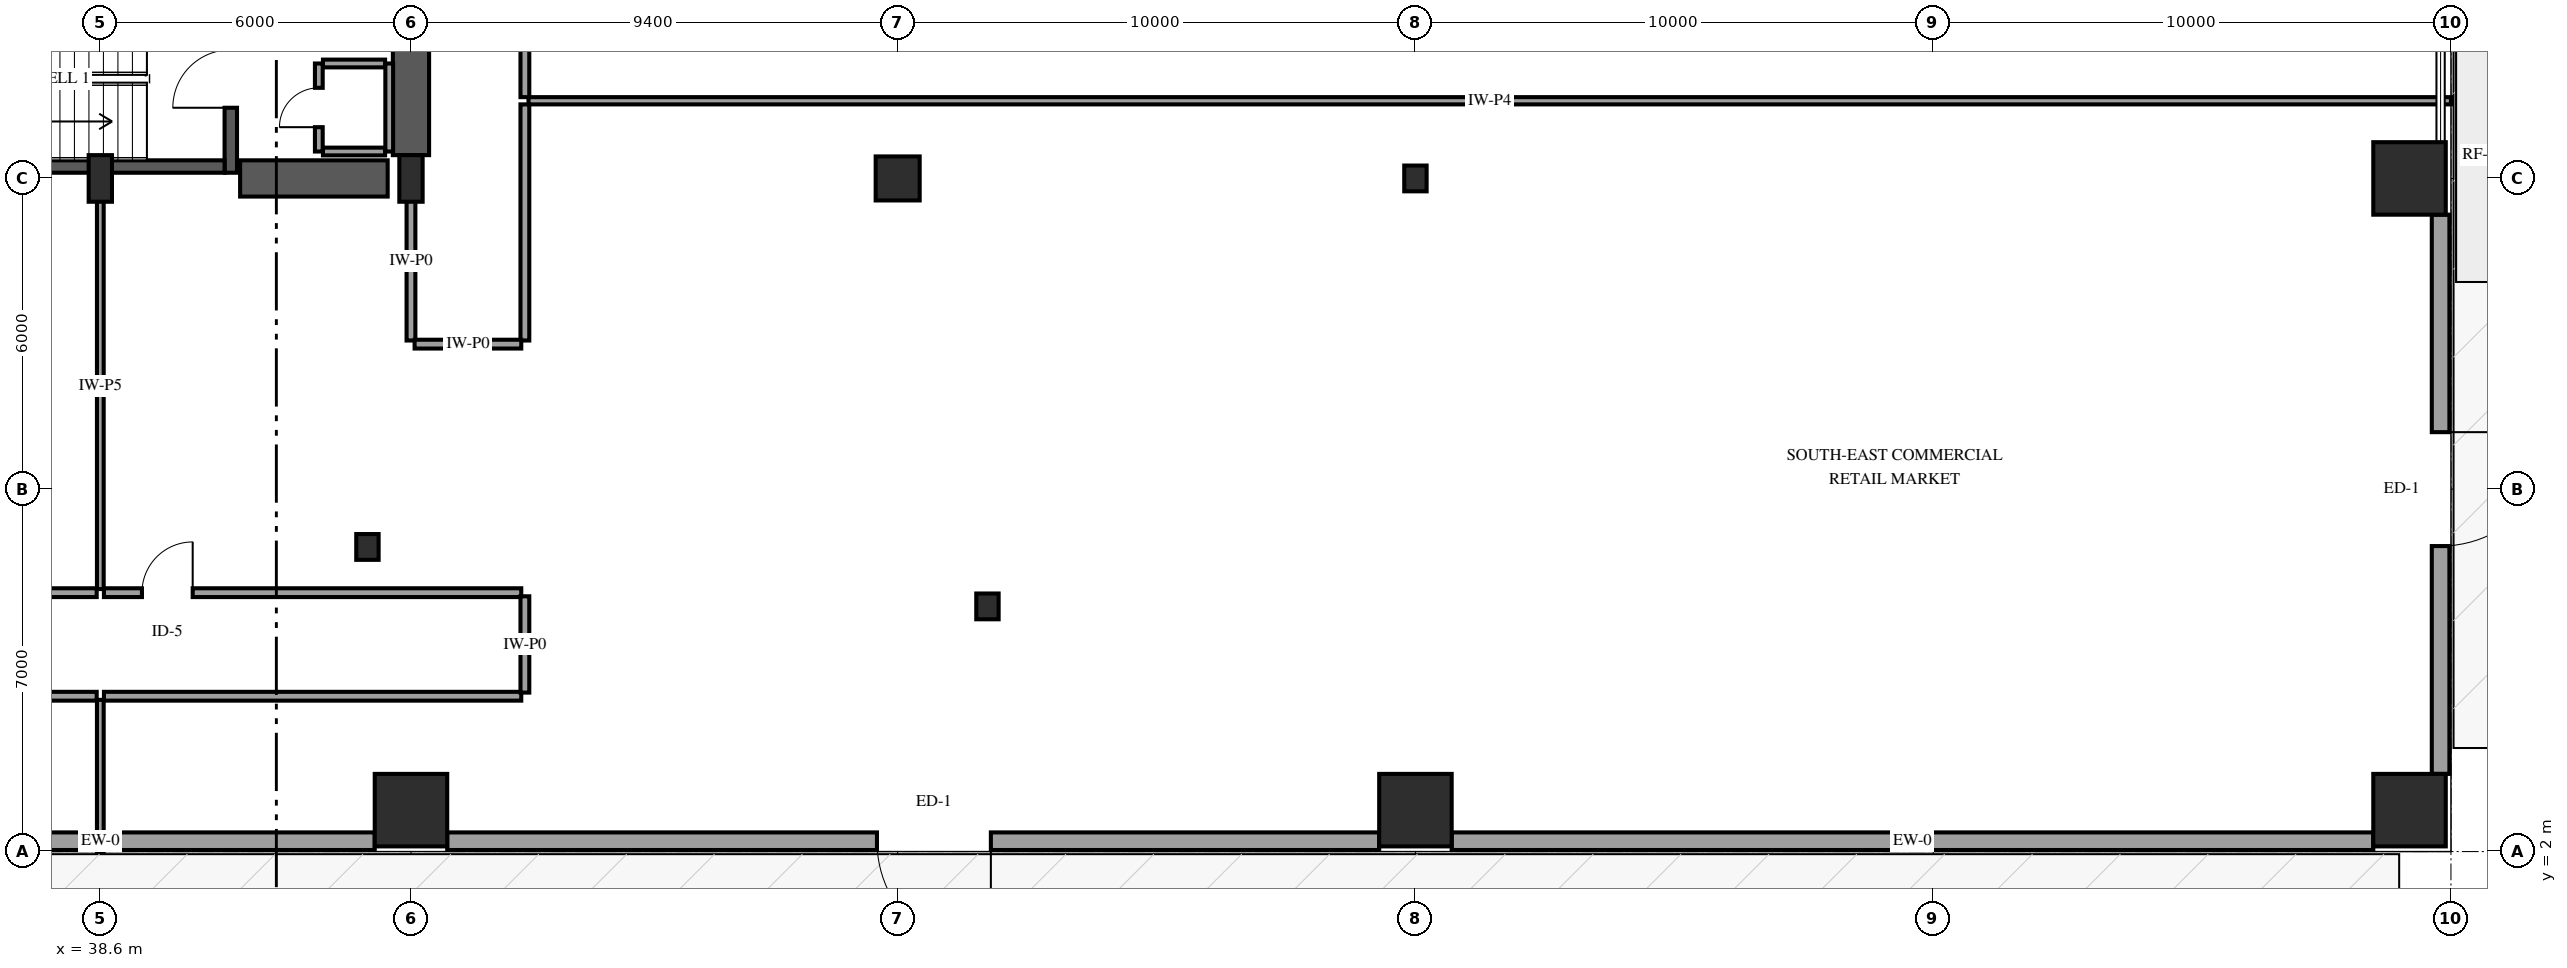
"""IFC4 building model, lengths in metres.
Left out: names, types, materials, properties, quantities, classifications, styles, units other than length and angle.
Written with IfcOpenShell. Run it as: python <this file> out.ifc"""

import sys

from ifc_helpers import new_model, si_unit, direction, frame, frame_2d, origin, origin_2d, place, context, subcontext, project, spatial, rectangle, i_section, extrude, element, fill, save


model = new_model("IFC4")
c1 = context("Model", 3, precision=1e-05, world=origin(), true_north=direction((0.0, 1.0)))
c2 = subcontext(c1, "Body", "Model", "MODEL_VIEW")
j1 = project(units=[si_unit("LENGTHUNIT", "METRE"), si_unit("PLANEANGLEUNIT", "RADIAN")], contexts=[c1])
p1 = place(None, origin())
s1 = spatial("IfcSite", under=j1, at=p1, CompositionType="ELEMENT")
p2 = place(p1, origin())
s2 = spatial("IfcBuilding", under=s1, at=p2, CompositionType="ELEMENT")
p3 = place(p2, origin())
s3 = spatial("IfcBuildingStorey", under=s2, at=p3, CompositionType="ELEMENT", Elevation=0.0)
p4 = place(p3, frame((41.12, 15.11, 0.0), z_axis=(0.0, 0.0, 1.0), x_axis=(0.0, 1.0, 0.0)))
e1 = element("IfcWall", 1, at=p4, inside=s3, PredefinedType="SHEAR", context=c2, shape_type="SweptSolid", body=[
    extrude(rectangle(XDim=3.63, YDim=0.24, at=frame_2d((1.815, 0.0))), origin(), (0.0, 0.0, 1.0), 6.0),
])
p5 = place(p4, frame((1.255, 0.0, 0.0)))
e2 = element("IfcOpeningElement", 2, at=p5, cuts=e1, PredefinedType="OPENING", context=c2, shape_type="SweptSolid", body=[
    extrude(rectangle(XDim=1.12, YDim=2.15, at=frame_2d((0.56, 1.075))), frame((0.0, 0.13, 0.0), z_axis=(0.0, -1.0, 0.0), x_axis=(1.0, 0.0, 0.0)), (0.0, 0.0, 1.0), 0.26),
])
p6 = place(p3, frame((33.0, 15.23, 0.0), z_axis=(0.0, 0.0, 1.0), x_axis=(1.0, 0.0, 0.0)))
e3 = element("IfcWall", 3, at=p6, inside=s3, PredefinedType="SHEAR", context=c2, shape_type="SweptSolid", body=[
    extrude(rectangle(XDim=8.0, YDim=0.24, at=frame_2d((4.0, 0.0))), origin(), (0.0, 0.0, 1.0), 6.0),
])
p7 = place(p3, frame((41.3, 15.0, 0.0), z_axis=(0.0, 0.0, 1.0), x_axis=(1.0, 0.0, 0.0)))
e4 = element("IfcWall", 4, at=p7, inside=s3, PredefinedType="SHEAR", context=c2, shape_type="SweptSolid", body=[
    extrude(rectangle(XDim=2.85, YDim=0.7, at=frame_2d((1.425, 0.0))), origin(), (0.0, 0.0, 1.0), 6.0),
])
p8 = place(p3, frame((44.6, 15.45, 0.0), z_axis=(0.0, 0.0, 1.0), x_axis=(0.0, 1.0, 0.0)))
e5 = element("IfcWall", 5, at=p8, inside=s3, PredefinedType="SHEAR", context=c2, shape_type="SweptSolid", body=[
    extrude(rectangle(XDim=6.35, YDim=0.7, at=frame_2d((3.175, 0.0))), origin(), (0.0, 0.0, 1.0), 6.0),
])
for number, where, z_axis, x_axis in (
    (6, (38.6, 15.0, 0.0), (0.0, 0.0, 1.0), (1.0, 0.0, 0.0)),
    (7, (44.6, 15.0, 0.0), (0.0, 0.0, 1.0), (1.0, 0.0, 0.0)),
):
    element("IfcColumn", number, at=place(p3, frame(where, z_axis=z_axis, x_axis=x_axis)), inside=s3, PredefinedType="PILASTER", context=c2, shape_type="SweptSolid", body=[
        extrude(rectangle(XDim=0.45, YDim=0.9, at=origin_2d()), origin(), (0.0, 0.0, 1.0), 6.0),
    ])
for number, where, z_axis, x_axis in (
    (8, (64.0, 2.8, 0.0), (0.0, 0.0, 1.0), (1.0, 0.0, 0.0)),
    (9, (83.2, 2.8, 0.0), (0.0, 0.0, 1.0), (1.0, 0.0, 0.0)),
):
    element("IfcColumn", number, at=place(p3, frame(where, z_axis=z_axis, x_axis=x_axis)), inside=s3, PredefinedType="COLUMN", context=c2, shape_type="SweptSolid", body=[
        extrude(rectangle(XDim=1.4, YDim=1.4, at=origin_2d()), origin(), (0.0, 0.0, 1.0), 6.0),
    ])
p9 = place(p3, frame((64.0, 15.0, 0.0), z_axis=(0.0, 0.0, 1.0), x_axis=(1.0, 0.0, 0.0)))
e10 = element("IfcColumn", 10, at=p9, inside=s3, PredefinedType="COLUMN", context=c2, shape_type="SweptSolid", body=[
    extrude(i_section(OverallWidth=0.432, OverallDepth=0.498, WebThickness=0.056, FlangeThickness=0.089, FilletRadius=0.038, at=origin_2d()), origin(), (0.0, 0.0, 1.0), 6.0),
])
for number, where, z_axis, x_axis in (
    (11, (83.2, 15.0, 0.0), (0.0, 0.0, 1.0), (1.0, 0.0, 0.0)),
    (12, (44.6, 2.8, 0.0), (0.0, 0.0, 1.0), (1.0, 0.0, 0.0)),
):
    element("IfcColumn", number, at=place(p3, frame(where, z_axis=z_axis, x_axis=x_axis)), inside=s3, PredefinedType="COLUMN", context=c2, shape_type="SweptSolid", body=[
        extrude(rectangle(XDim=1.4, YDim=1.4, at=origin_2d()), origin(), (0.0, 0.0, 1.0), 6.0),
    ])
p10 = place(p3, frame((54.0, 15.0, 0.0), z_axis=(0.0, 0.0, 1.0), x_axis=(1.0, 0.0, 0.0)))
e13 = element("IfcColumn", 13, at=p10, inside=s3, PredefinedType="COLUMN", context=c2, shape_type="SweptSolid", body=[
    extrude(rectangle(XDim=0.85, YDim=0.85, at=origin_2d()), origin(), (0.0, 0.0, 1.0), 6.0),
])
for number, where, z_axis, x_axis in (
    (14, (43.759, 7.883, 0.0), (0.0, 0.0, 1.0), (1.0, 0.0, 0.0)),
    (15, (55.734, 6.735, 0.0), (0.0, 0.0, 1.0), (1.0, 0.0, 0.0)),
):
    element("IfcColumn", number, at=place(p3, frame(where, z_axis=z_axis, x_axis=x_axis)), inside=s3, PredefinedType="COLUMN", context=c2, shape_type="SweptSolid", body=[
        extrude(i_section(OverallWidth=0.432, OverallDepth=0.498, WebThickness=0.056, FlangeThickness=0.089, FilletRadius=0.038, at=origin_2d()), origin(), (0.0, 0.0, 1.0), 6.0),
    ])
p11 = place(p3, frame((43.9, 2.2, 0.0), z_axis=(0.0, 0.0, 1.0), x_axis=(-1.0, 0.0, 0.0)))
e16 = element("IfcWall", 16, at=p11, inside=s3, PredefinedType="SOLIDWALL", context=c2, shape_type="SweptSolid", body=[
    extrude(rectangle(XDim=10.6, YDim=0.34, at=frame_2d((5.3, 0.0))), origin(), (0.0, 0.0, 1.0), 2.64),
])
p12 = place(p11, frame((6.8, 0.0, 0.0)))
e17 = element("IfcOpeningElement", 17, at=p12, cuts=e16, PredefinedType="OPENING", context=c2, shape_type="SweptSolid", body=[
    extrude(rectangle(XDim=1.8, YDim=2.3, at=frame_2d((0.9, 1.15))), frame((0.0, 0.18, 0.0), z_axis=(0.0, -1.0, 0.0), x_axis=(1.0, 0.0, 0.0)), (0.0, 0.0, 1.0), 0.36),
])
p13 = place(p3, frame((63.3, 2.2, 0.0), z_axis=(0.0, 0.0, 1.0), x_axis=(-1.0, 0.0, 0.0)))
e18 = element("IfcWall", 18, at=p13, inside=s3, PredefinedType="SOLIDWALL", context=c2, shape_type="SweptSolid", body=[
    extrude(rectangle(XDim=18.0, YDim=0.34, at=frame_2d((9.0, 0.0))), origin(), (0.0, 0.0, 1.0), 4.736),
])
p14 = place(p13, frame((7.5, 0.0, 0.0)))
e19 = element("IfcOpeningElement", 19, at=p14, cuts=e18, PredefinedType="OPENING", context=c2, shape_type="SweptSolid", body=[
    extrude(rectangle(XDim=2.2, YDim=2.4, at=frame_2d((1.1, 1.2))), frame((0.0, 0.18, 0.0), z_axis=(0.0, -1.0, 0.0), x_axis=(1.0, 0.0, 0.0)), (0.0, 0.0, 1.0), 0.36),
])
p15 = place(p3, frame((82.5, 2.2, 0.0), z_axis=(0.0, 0.0, 1.0), x_axis=(-1.0, 0.0, 0.0)))
e20 = element("IfcWall", 20, at=p15, inside=s3, PredefinedType="SOLIDWALL", context=c2, shape_type="SweptSolid", body=[
    extrude(rectangle(XDim=17.8, YDim=0.34, at=frame_2d((8.9, 0.0))), origin(), (0.0, 0.0, 1.0), 4.736),
])
p16 = place(p3, frame((83.8, 14.3, 0.0), z_axis=(0.0, 0.0, 1.0), x_axis=(0.0, -1.0, 0.0)))
e21 = element("IfcWall", 21, at=p16, inside=s3, PredefinedType="SOLIDWALL", context=c2, shape_type="SweptSolid", body=[
    extrude(rectangle(XDim=10.8, YDim=0.34, at=frame_2d((5.4, 0.0))), origin(), (0.0, 0.0, 1.0), 4.736),
])
p17 = place(p16, frame((4.2, 0.0, 0.0)))
e22 = element("IfcOpeningElement", 22, at=p17, cuts=e21, PredefinedType="OPENING", context=c2, shape_type="SweptSolid", body=[
    extrude(rectangle(XDim=2.2, YDim=2.4, at=frame_2d((1.1, 1.2))), frame((0.0, 0.18, 0.0), z_axis=(0.0, -1.0, 0.0), x_axis=(1.0, 0.0, 0.0)), (0.0, 0.0, 1.0), 0.36),
])
for number, where, z_axis, x_axis in (
    (23, (42.9, 15.52, 0.0), (0.0, 0.0, 1.0), (1.0, 0.0, 0.0)),
    (24, (42.9, 17.22, 0.0), (0.0, 0.0, 1.0), (1.0, 0.0, 0.0)),
):
    element("IfcWall", number, at=place(p3, frame(where, z_axis=z_axis, x_axis=x_axis)), inside=s3, PredefinedType="PARTITIONING", context=c2, shape_type="SweptSolid", body=[
        extrude(rectangle(XDim=1.2, YDim=0.15, at=frame_2d((0.6, 0.0))), origin(), (0.0, 0.0, 1.0), 5.68),
    ])
p18 = place(p3, frame((44.18, 15.52, 0.0), z_axis=(0.0, 0.0, 1.0), x_axis=(0.0, 1.0, 0.0)))
e25 = element("IfcWall", 25, at=p18, inside=s3, PredefinedType="PARTITIONING", context=c2, shape_type="SweptSolid", body=[
    extrude(rectangle(XDim=1.7, YDim=0.15, at=frame_2d((0.85, 0.0))), origin(), (0.0, 0.0, 1.0), 5.68),
])
p19 = place(p3, frame((42.82, 15.52, 0.0), z_axis=(0.0, 0.0, 1.0), x_axis=(0.0, 1.0, 0.0)))
e26 = element("IfcWall", 26, at=p19, inside=s3, PredefinedType="PARTITIONING", context=c2, shape_type="SweptSolid", body=[
    extrude(rectangle(XDim=1.7, YDim=0.15, at=frame_2d((0.85, 0.0))), origin(), (0.0, 0.0, 1.0), 5.68),
])
p20 = place(p19, frame((0.47, 0.0, 0.0)))
e27 = element("IfcOpeningElement", 27, at=p20, cuts=e26, PredefinedType="OPENING", context=c2, shape_type="SweptSolid", body=[
    extrude(rectangle(XDim=0.76, YDim=2.0, at=frame_2d((0.38, 1.0))), frame((0.0, 0.085, 0.0), z_axis=(0.0, -1.0, 0.0), x_axis=(1.0, 0.0, 0.0)), (0.0, 0.0, 1.0), 0.17),
])
p21 = place(p3, frame((46.87, 16.5, 0.0), z_axis=(0.0, 0.0, 1.0), x_axis=(1.0, 0.0, 0.0)))
e28 = element("IfcWall", 28, at=p21, inside=s3, PredefinedType="PARTITIONING", context=c2, shape_type="SweptSolid", body=[
    extrude(rectangle(XDim=37.13, YDim=0.14, at=frame_2d((18.565, 0.0))), origin(), (0.0, 0.0, 1.0), 5.68),
])
p22 = place(p3, frame((38.53, 5.0, 0.0), z_axis=(0.0, 0.0, 1.0), x_axis=(-1.0, 0.0, 0.0)))
e29 = element("IfcWall", 29, at=p22, inside=s3, PredefinedType="PARTITIONING", context=c2, shape_type="SweptSolid", body=[
    extrude(rectangle(XDim=24.46, YDim=0.17, at=frame_2d((12.23, 0.0))), origin(), (0.0, 0.0, 1.0), 5.68),
])
p23 = place(p22, frame((11.755, 0.0, 0.0)))
e30 = element("IfcOpeningElement", 30, at=p23, cuts=e29, PredefinedType="OPENING", context=c2, shape_type="SweptSolid", body=[
    extrude(rectangle(XDim=0.98, YDim=2.15, at=frame_2d((0.49, 1.075))), frame((0.0, 0.095, 0.0), z_axis=(0.0, -1.0, 0.0), x_axis=(1.0, 0.0, 0.0)), (0.0, 0.0, 1.0), 0.19),
])
p24 = place(p3, frame((46.8, 33.43, 0.0), z_axis=(0.0, 0.0, 1.0), x_axis=(0.0, -1.0, 0.0)))
e31 = element("IfcWall", 31, at=p24, inside=s3, PredefinedType="PARTITIONING", context=c2, shape_type="SweptSolid", body=[
    extrude(rectangle(XDim=16.86, YDim=0.17, at=frame_2d((8.43, 0.0))), origin(), (0.0, 0.0, 1.0), 5.68),
])
p25 = place(p24, frame((7.955, 0.0, 0.0)))
e32 = element("IfcOpeningElement", 32, at=p25, cuts=e31, PredefinedType="OPENING", context=c2, shape_type="SweptSolid", body=[
    extrude(rectangle(XDim=0.98, YDim=2.15, at=frame_2d((0.49, 1.075))), frame((0.0, 0.095, 0.0), z_axis=(0.0, -1.0, 0.0), x_axis=(1.0, 0.0, 0.0)), (0.0, 0.0, 1.0), 0.19),
])
p26 = place(p3, frame((38.67, 7.0, 0.0), z_axis=(0.0, 0.0, 1.0), x_axis=(1.0, 0.0, 0.0)))
e33 = element("IfcWall", 33, at=p26, inside=s3, PredefinedType="PARTITIONING", context=c2, shape_type="SweptSolid", body=[
    extrude(rectangle(XDim=8.06, YDim=0.17, at=frame_2d((4.03, 0.0))), origin(), (0.0, 0.0, 1.0), 5.68),
])
p27 = place(p26, frame((0.734, 0.0, 0.0)))
e34 = element("IfcOpeningElement", 34, at=p27, cuts=e33, PredefinedType="OPENING", context=c2, shape_type="SweptSolid", body=[
    extrude(rectangle(XDim=0.98, YDim=2.15, at=frame_2d((0.49, 1.075))), frame((0.0, 0.095, 0.0), z_axis=(0.0, -1.0, 0.0), x_axis=(1.0, 0.0, 0.0)), (0.0, 0.0, 1.0), 0.19),
])
p28 = place(p3, frame((46.73, 5.0, 0.0), z_axis=(0.0, 0.0, 1.0), x_axis=(-1.0, 0.0, 0.0)))
e35 = element("IfcWall", 35, at=p28, inside=s3, PredefinedType="PARTITIONING", context=c2, shape_type="SweptSolid", body=[
    extrude(rectangle(XDim=8.06, YDim=0.17, at=frame_2d((4.03, 0.0))), origin(), (0.0, 0.0, 1.0), 5.68),
])
p29 = place(p3, frame((38.6, 7.07, 0.0), z_axis=(0.0, 0.0, 1.0), x_axis=(0.0, 1.0, 0.0)))
e36 = element("IfcWall", 36, at=p29, inside=s3, PredefinedType="PARTITIONING", context=c2, shape_type="SweptSolid", body=[
    extrude(rectangle(XDim=7.86, YDim=0.13, at=frame_2d((3.93, 0.0))), origin(), (0.0, 0.0, 1.0), 5.68),
])
p30 = place(p3, frame((32.67, 7.0, 0.0), z_axis=(0.0, 0.0, 1.0), x_axis=(1.0, 0.0, 0.0)))
e37 = element("IfcWall", 37, at=p30, inside=s3, PredefinedType="PARTITIONING", context=c2, shape_type="SweptSolid", body=[
    extrude(rectangle(XDim=5.86, YDim=0.17, at=frame_2d((2.93, 0.0))), origin(), (0.0, 0.0, 1.0), 5.68),
])
p31 = place(p3, frame((46.8, 16.43, 0.0), z_axis=(0.0, 0.0, 1.0), x_axis=(0.0, -1.0, 0.0)))
e38 = element("IfcWall", 38, at=p31, inside=s3, PredefinedType="PARTITIONING", context=c2, shape_type="SweptSolid", body=[
    extrude(rectangle(XDim=4.56, YDim=0.17, at=frame_2d((2.28, 0.0))), origin(), (0.0, 0.0, 1.0), 5.68),
])
p32 = place(p3, frame((44.6, 11.87, 0.0), z_axis=(0.0, 0.0, 1.0), x_axis=(0.0, 1.0, 0.0)))
e39 = element("IfcWall", 39, at=p32, inside=s3, PredefinedType="PARTITIONING", context=c2, shape_type="SweptSolid", body=[
    extrude(rectangle(XDim=3.06, YDim=0.17, at=frame_2d((1.53, 0.0))), origin(), (0.0, 0.0, 1.0), 4.802),
])
p33 = place(p3, frame((38.6, 4.93, 0.0), z_axis=(0.0, 0.0, 1.0), x_axis=(0.0, -1.0, 0.0)))
e40 = element("IfcWall", 40, at=p33, inside=s3, PredefinedType="PARTITIONING", context=c2, shape_type="SweptSolid", body=[
    extrude(rectangle(XDim=2.93, YDim=0.13, at=frame_2d((1.465, 0.0))), origin(), (0.0, 0.0, 1.0), 5.68),
])
p34 = place(p3, frame((46.73, 11.8, 0.0), z_axis=(0.0, 0.0, 1.0), x_axis=(-1.0, 0.0, 0.0)))
e41 = element("IfcWall", 41, at=p34, inside=s3, PredefinedType="PARTITIONING", context=c2, shape_type="SweptSolid", body=[
    extrude(rectangle(XDim=2.06, YDim=0.17, at=frame_2d((1.03, 0.0))), origin(), (0.0, 0.0, 1.0), 5.68),
])
p35 = place(p3, frame((46.8, 6.93, 0.0), z_axis=(0.0, 0.0, 1.0), x_axis=(0.0, -1.0, 0.0)))
e42 = element("IfcWall", 42, at=p35, inside=s3, PredefinedType="PARTITIONING", context=c2, shape_type="SweptSolid", body=[
    extrude(rectangle(XDim=1.86, YDim=0.17, at=frame_2d((0.93, 0.0))), origin(), (0.0, 0.0, 1.0), 5.68),
])
p36 = place(p14, origin())
e43 = element("IfcDoor", 43, at=p36, inside=s3, OperationType="SINGLE_SWING_LEFT", PredefinedType="DOOR", context=c2, shape_type="SweptSolid", body=[
    extrude(rectangle(XDim=2.2, YDim=2.4, at=frame_2d((1.1, 1.2))), frame((0.0, 0.025, 0.0), z_axis=(0.0, -1.0, 0.0), x_axis=(1.0, 0.0, 0.0)), (0.0, 0.0, 1.0), 0.05),
])
fill(e19, e43)
p37 = place(p17, origin())
e44 = element("IfcDoor", 44, at=p37, inside=s3, OperationType="SINGLE_SWING_LEFT", PredefinedType="DOOR", context=c2, shape_type="SweptSolid", body=[
    extrude(rectangle(XDim=2.2, YDim=2.4, at=frame_2d((1.1, 1.2))), frame((0.0, 0.025, 0.0), z_axis=(0.0, -1.0, 0.0), x_axis=(1.0, 0.0, 0.0)), (0.0, 0.0, 1.0), 0.05),
])
fill(e22, e44)
p38 = place(p5, origin())
e45 = element("IfcDoor", 45, at=p38, inside=s3, OperationType="SINGLE_SWING_LEFT", PredefinedType="DOOR", context=c2, shape_type="SweptSolid", body=[
    extrude(rectangle(XDim=1.12, YDim=2.15, at=frame_2d((0.56, 1.075))), frame((0.0, 0.025, 0.0), z_axis=(0.0, -1.0, 0.0), x_axis=(1.0, 0.0, 0.0)), (0.0, 0.0, 1.0), 0.05),
])
fill(e2, e45)
p39 = place(p20, origin())
e46 = element("IfcDoor", 46, at=p39, inside=s3, OperationType="SINGLE_SWING_LEFT", PredefinedType="TRAPDOOR", context=c2, shape_type="SweptSolid", body=[
    extrude(rectangle(XDim=0.76, YDim=2.0, at=frame_2d((0.38, 1.0))), frame((0.0, 0.025, 0.0), z_axis=(0.0, -1.0, 0.0), x_axis=(1.0, 0.0, 0.0)), (0.0, 0.0, 1.0), 0.05),
])
fill(e27, e46)
p40 = place(p27, origin())
e47 = element("IfcDoor", 47, at=p40, inside=s3, OperationType="SINGLE_SWING_RIGHT", PredefinedType="DOOR", context=c2, shape_type="SweptSolid", body=[
    extrude(rectangle(XDim=0.98, YDim=2.15, at=frame_2d((0.49, 1.075))), frame((0.0, 0.025, 0.0), z_axis=(0.0, -1.0, 0.0), x_axis=(1.0, 0.0, 0.0)), (0.0, 0.0, 1.0), 0.05),
])
fill(e34, e47)
save(model, sys.argv[1])
